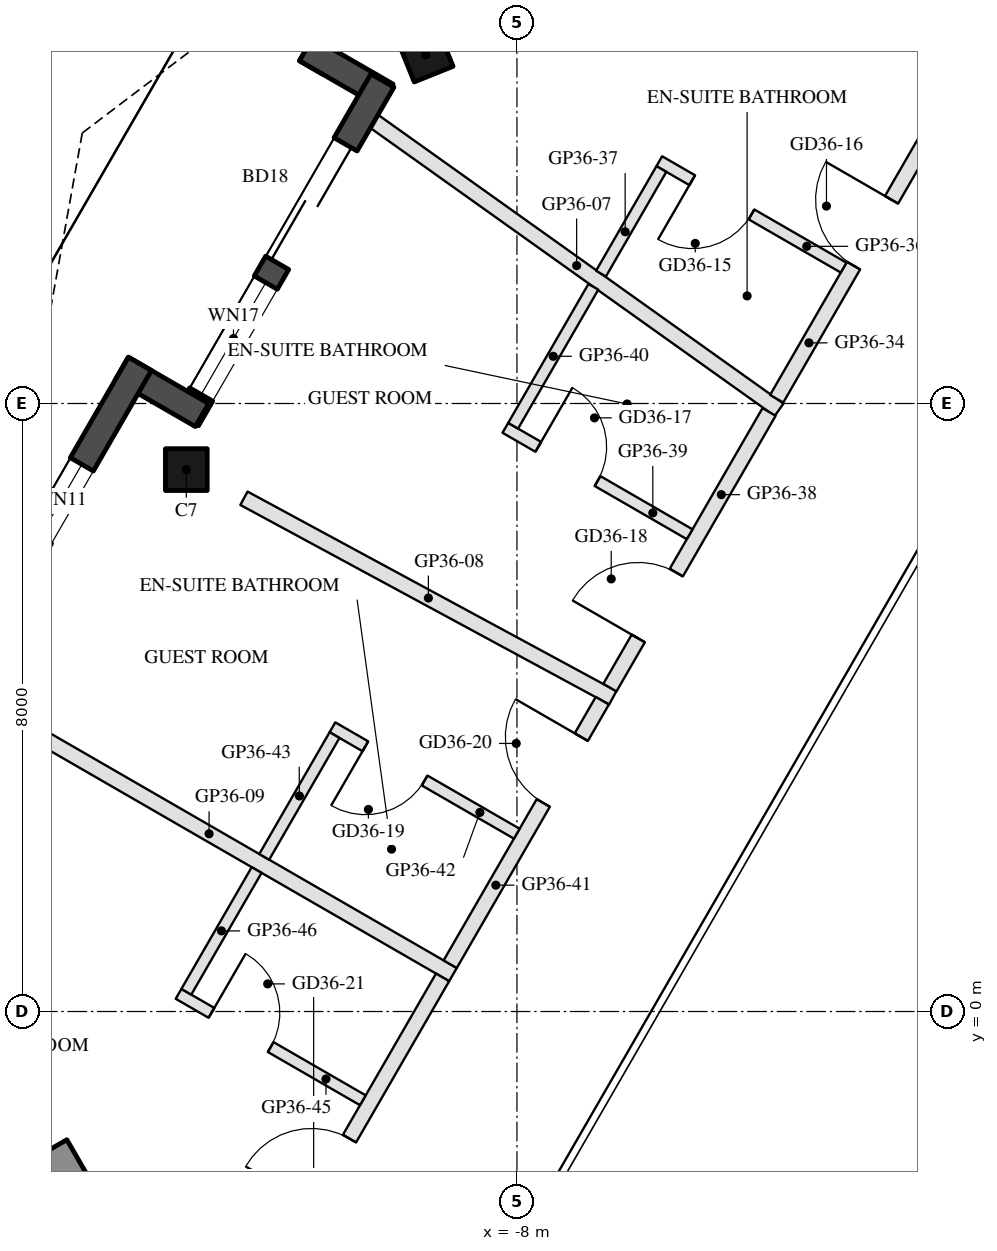
"""IFC4 building model, lengths in metres.
Left out: names, types, materials, properties, quantities, classifications, styles, units other than length and angle.
Written with IfcOpenShell. Run it as: python <this file> out.ifc"""

import sys

from ifc_helpers import new_model, si_unit, direction, frame, frame_2d, origin, origin_2d, place, context, subcontext, project, spatial, rectangle, hollow_rectangle, extrude, boolean, halfspace, element, fill, save


model = new_model("IFC4")
c1 = context("Model", 3, precision=1e-05, world=origin(), true_north=direction((0.0, 1.0)))
c2 = subcontext(c1, "Body", "Model", "MODEL_VIEW")
j1 = project(units=[si_unit("LENGTHUNIT", "METRE"), si_unit("PLANEANGLEUNIT", "RADIAN")], contexts=[c1])
p1 = place(None, origin())
s1 = spatial("IfcSite", under=j1, at=p1, CompositionType="ELEMENT")
p2 = place(p1, origin())
s2 = spatial("IfcBuilding", under=s1, at=p2, CompositionType="ELEMENT")
p3 = place(p2, frame((0.0, 0.0, 328.1)))
s3 = spatial("IfcBuildingStorey", under=s2, at=p3, CompositionType="ELEMENT", Elevation=328.1)
p4 = place(p3, frame((-9.198, 12.588, 0.0), z_axis=(0.100518021011, -0.128316722417, 0.98662604172), x_axis=(0.503129383785, 0.862065632243, 0.060857775822)))
e1 = element("IfcColumn", 1, at=p4, inside=s3, PredefinedType="COLUMN", context=c2, shape_type="SweptSolid", body=[
    boolean("DIFFERENCE", boolean("DIFFERENCE", extrude(hollow_rectangle(XDim=0.55, YDim=0.55, WallThickness=0.025, at=origin_2d()), origin(), (0.0, 0.0, 1.0), 3.75), halfspace(frame((0.0, 0.0, 0.034), z_axis=(0.0, 0.0, 1.0), x_axis=(1.0, 0.0, 0.0)), True)), halfspace(frame((0.0, 0.0, 3.735), z_axis=(0.0, 0.0, 1.0), x_axis=(1.0, 0.0, 0.0)), False)),
])
p5 = place(p3, frame((-12.35, 7.13, 0.0), z_axis=(0.131228839908, -0.075723997581, 0.988455799602), x_axis=(0.499707328911, 0.866194311446, 1.5866039e-05)))
e2 = element("IfcColumn", 2, at=p5, inside=s3, PredefinedType="COLUMN", context=c2, shape_type="SweptSolid", body=[
    boolean("DIFFERENCE", boolean("DIFFERENCE", extrude(hollow_rectangle(XDim=0.55, YDim=0.55, WallThickness=0.025, at=origin_2d()), origin(), (0.0, 0.0, 1.0), 3.743), halfspace(frame((0.0, 0.0, 0.031), z_axis=(0.0, 0.0, 1.0), x_axis=(1.0, 0.0, 0.0)), True)), halfspace(frame((0.0, 0.0, 3.729), z_axis=(0.0, 0.0, 1.0), x_axis=(1.0, 0.0, 0.0)), False)),
])
p6 = place(p3, frame((-5.905, 20.742, 0.0), z_axis=(0.0, 0.0, 1.0), x_axis=(-0.500003254449, -0.866023524819, 0.0)))
e3 = element("IfcWall", 3, at=p6, inside=s3, PredefinedType="SOLIDWALL", context=c2, shape_type="SweptSolid", body=[
    extrude(rectangle(XDim=9.608, YDim=0.35, at=frame_2d((4.804, 0.0))), origin(), (0.0, 0.0, 1.0), 3.45),
])
p7 = place(p6, frame((0.45, 0.0, 0.3)))
e4 = element("IfcOpeningElement", 4, at=p7, cuts=e3, PredefinedType="OPENING", context=c2, shape_type="SweptSolid", body=[
    extrude(rectangle(XDim=1.4, YDim=2.65, at=frame_2d((0.7, 1.325))), frame((0.0, 0.185, 0.0), z_axis=(0.0, -1.0, 0.0), x_axis=(1.0, 0.0, 0.0)), (0.0, 0.0, 1.0), 0.37),
])
p8 = place(p6, frame((5.68, 0.0, 0.0)))
e5 = element("IfcOpeningElement", 5, at=p8, cuts=e3, PredefinedType="OPENING", context=c2, shape_type="SweptSolid", body=[
    extrude(rectangle(XDim=2.4, YDim=2.4, at=frame_2d((1.2, 1.2))), frame((0.0, 0.185, 0.0), z_axis=(0.0, -1.0, 0.0), x_axis=(1.0, 0.0, 0.0)), (0.0, 0.0, 1.0), 0.37),
])
p9 = place(p6, frame((3.492, 0.0, 0.3)))
e6 = element("IfcOpeningElement", 6, at=p9, cuts=e3, PredefinedType="OPENING", context=c2, shape_type="SweptSolid", body=[
    extrude(rectangle(XDim=1.8, YDim=2.65, at=frame_2d((0.9, 1.325))), frame((0.0, 0.185, 0.0), z_axis=(0.0, -1.0, 0.0), x_axis=(1.0, 0.0, 0.0)), (0.0, 0.0, 1.0), 0.37),
])
p10 = place(p3, frame((-10.774, 12.66, 0.0), z_axis=(0.0, 0.0, 1.0), x_axis=(0.866142280446, -0.499797509021, 0.0)))
e7 = element("IfcWall", 7, at=p10, inside=s3, PredefinedType="SOLIDWALL", context=c2, shape_type="SweptSolid", body=[
    extrude(rectangle(XDim=1.22, YDim=0.35, at=frame_2d((0.61, 0.0))), origin(), (0.0, 0.0, 1.0), 3.45),
])
p11 = place(p3, frame((-9.77, 12.249, 0.0), z_axis=(0.0, 0.0, 1.0), x_axis=(-0.499999159329, -0.866025889145, 0.0)))
e8 = element("IfcWall", 8, at=p11, inside=s3, PredefinedType="SOLIDWALL", context=c2, shape_type="SweptSolid", body=[
    extrude(rectangle(XDim=5.143, YDim=0.35, at=frame_2d((2.571, 0.0))), origin(), (0.0, 0.0, 1.0), 3.45),
])
p12 = place(p11, frame((0.969, 0.0, 0.0)))
e9 = element("IfcOpeningElement", 9, at=p12, cuts=e8, PredefinedType="OPENING", context=c2, shape_type="SweptSolid", body=[
    extrude(rectangle(XDim=1.8, YDim=2.4, at=frame_2d((0.9, 1.2))), frame((0.0, 0.185, 0.0), z_axis=(0.0, -1.0, 0.0), x_axis=(1.0, 0.0, 0.0)), (0.0, 0.0, 1.0), 0.37),
])
p13 = place(p11, frame((3.069, 0.0, 0.3)))
e10 = element("IfcOpeningElement", 10, at=p13, cuts=e8, PredefinedType="OPENING", context=c2, shape_type="SweptSolid", body=[
    extrude(rectangle(XDim=1.7, YDim=2.65, at=frame_2d((0.85, 1.325))), frame((0.0, 0.185, 0.0), z_axis=(0.0, -1.0, 0.0), x_axis=(1.0, 0.0, 0.0)), (0.0, 0.0, 1.0), 0.37),
])
p14 = place(p3, frame((-12.143, 7.848, 0.0), z_axis=(0.0, 0.0, 1.0), x_axis=(-0.865955602162, 0.500120880472, 0.0)))
e11 = element("IfcWall", 11, at=p14, inside=s3, PredefinedType="SOLIDWALL", context=c2, shape_type="SweptSolid", body=[
    extrude(rectangle(XDim=1.22, YDim=0.35, at=frame_2d((0.61, 0.0))), origin(), (0.0, 0.0, 1.0), 3.45),
])
p15 = place(p3, frame((-12.961, 8.522, 0.0), z_axis=(0.0, 0.0, 1.0), x_axis=(-0.499995447853, -0.866028031952, 0.0)))
e12 = element("IfcWall", 12, at=p15, inside=s3, PredefinedType="SOLIDWALL", context=c2, shape_type="SweptSolid", body=[
    extrude(rectangle(XDim=8.103, YDim=0.35, at=frame_2d((4.051, 0.0))), origin(), (0.0, 0.0, 1.0), 3.45),
])
p16 = place(p15, frame((2.95, 0.0, 0.0)))
e13 = element("IfcOpeningElement", 13, at=p16, cuts=e12, PredefinedType="OPENING", context=c2, shape_type="SweptSolid", body=[
    extrude(rectangle(XDim=1.5, YDim=2.4, at=frame_2d((0.75, 1.2))), frame((0.0, 0.185, 0.0), z_axis=(0.0, -1.0, 0.0), x_axis=(1.0, 0.0, 0.0)), (0.0, 0.0, 1.0), 0.37),
])
p17 = place(p15, frame((1.528, 0.0, 0.3)))
e14 = element("IfcOpeningElement", 14, at=p17, cuts=e12, PredefinedType="OPENING", context=c2, shape_type="SweptSolid", body=[
    extrude(rectangle(XDim=1.1, YDim=2.65, at=frame_2d((0.55, 1.325))), frame((0.0, 0.185, 0.0), z_axis=(0.0, -1.0, 0.0), x_axis=(1.0, 0.0, 0.0)), (0.0, 0.0, 1.0), 0.37),
])
p18 = place(p15, frame((5.35, 0.0, 0.3)))
e15 = element("IfcOpeningElement", 15, at=p18, cuts=e12, PredefinedType="OPENING", context=c2, shape_type="SweptSolid", body=[
    extrude(rectangle(XDim=0.9, YDim=2.65, at=frame_2d((0.45, 1.325))), frame((0.0, 0.185, 0.0), z_axis=(0.0, -1.0, 0.0), x_axis=(1.0, 0.0, 0.0)), (0.0, 0.0, 1.0), 0.37),
])
p19 = place(p3, frame((-13.797, -1.903, 0.0), z_axis=(0.0, 0.0, 1.0), x_axis=(-0.866020367552, -0.500008722908, 0.0)))
e16 = element("IfcWall", 16, at=p19, inside=s3, PredefinedType="SHEAR", context=c2, shape_type="SweptSolid", body=[
    extrude(rectangle(XDim=4.085, YDim=0.5, at=frame_2d((2.042, 0.0))), origin(), (0.0, 0.0, 1.0), 3.45),
])
p20 = place(p3, frame((-9.878, 11.712, 0.0), z_axis=(0.0, 0.0, 1.0), x_axis=(0.814431562196, -0.580259623357, 0.0)))
e17 = element("IfcWall", 17, at=p20, inside=s3, PredefinedType="PARTITIONING", context=c2, shape_type="SweptSolid", body=[
    extrude(rectangle(XDim=6.54, YDim=0.2, at=frame_2d((3.27, 0.0))), origin(), (0.0, 0.0, 1.0), 3.05),
])
p21 = place(p3, frame((-11.592, 6.753, 0.0), z_axis=(0.0, 0.0, 1.0), x_axis=(0.879564392882, -0.475779863776, 0.0)))
e18 = element("IfcWall", 18, at=p21, inside=s3, PredefinedType="PARTITIONING", context=c2, shape_type="SweptSolid", body=[
    extrude(rectangle(XDim=5.517, YDim=0.2, at=frame_2d((2.759, 0.0))), origin(), (0.0, 0.0, 1.0), 3.05),
])
p22 = place(p3, frame((-15.259, 4.191, 0.0), z_axis=(0.0, 0.0, 1.0), x_axis=(0.866022643759, -0.500004780474, 0.0)))
e19 = element("IfcWall", 19, at=p22, inside=s3, PredefinedType="PARTITIONING", context=c2, shape_type="SweptSolid", body=[
    extrude(rectangle(XDim=7.411, YDim=0.2, at=frame_2d((3.705, 0.0))), origin(), (0.0, 0.0, 1.0), 3.05),
])
p23 = place(p3, frame((-4.583, 8.062, 0.0), z_axis=(0.0, 0.0, 1.0), x_axis=(0.50000452617, 0.866022790583, 0.0)))
e20 = element("IfcWall", 20, at=p23, inside=s3, PredefinedType="PARTITIONING", context=c2, shape_type="SweptSolid", body=[
    extrude(rectangle(XDim=4.246, YDim=0.2, at=frame_2d((2.123, 0.0))), origin(), (0.0, 0.0, 1.0), 3.05),
])
p24 = place(p23, frame((2.023, 0.0, 0.0)))
e21 = element("IfcOpeningElement", 21, at=p24, cuts=e20, PredefinedType="OPENING", context=c2, shape_type="SweptSolid", body=[
    extrude(rectangle(XDim=1.0, YDim=2.1, at=frame_2d((0.5, 1.05))), frame((0.0, 0.11, 0.0), z_axis=(0.0, -1.0, 0.0), x_axis=(1.0, 0.0, 0.0)), (0.0, 0.0, 1.0), 0.22),
])
p25 = place(p3, frame((-3.702, 9.788, 0.0), z_axis=(0.0, 0.0, 1.0), x_axis=(-0.866034573852, 0.49998411664, 0.0)))
e22 = element("IfcWall", 22, at=p25, inside=s3, PredefinedType="PARTITIONING", context=c2, shape_type="SweptSolid", body=[
    extrude(rectangle(XDim=2.8, YDim=0.15, at=frame_2d((1.4, 0.0))), origin(), (0.0, 0.0, 1.0), 3.45),
])
p26 = place(p25, frame((1.4, 0.0, 0.0)))
e23 = element("IfcOpeningElement", 23, at=p26, cuts=e22, PredefinedType="OPENING", context=c2, shape_type="SweptSolid", body=[
    extrude(rectangle(XDim=0.9, YDim=2.1, at=frame_2d((0.45, 1.05))), frame((0.0, 0.085, 0.0), z_axis=(0.0, -1.0, 0.0), x_axis=(1.0, 0.0, 0.0)), (0.0, 0.0, 1.0), 0.17),
])
p27 = place(p3, frame((-6.1, 11.085, 0.0), z_axis=(0.0, 0.0, 1.0), x_axis=(-0.49987316553, -0.866098619317, 0.0)))
e24 = element("IfcWall", 24, at=p27, inside=s3, PredefinedType="PARTITIONING", context=c2, shape_type="SweptSolid", body=[
    extrude(rectangle(XDim=1.589, YDim=0.15, at=frame_2d((0.795, 0.0))), origin(), (0.0, 0.0, 1.0), 3.05),
])
p28 = place(p3, frame((-6.777, 4.262, 0.0), z_axis=(0.0, 0.0, 1.0), x_axis=(0.500026956598, 0.866009839826, 0.0)))
e25 = element("IfcWall", 25, at=p28, inside=s3, PredefinedType="PARTITIONING", context=c2, shape_type="SweptSolid", body=[
    extrude(rectangle(XDim=4.187, YDim=0.2, at=frame_2d((2.094, 0.0))), origin(), (0.0, 0.0, 1.0), 3.05),
])
p29 = place(p28, frame((0.747, 0.0, 0.0)))
e26 = element("IfcOpeningElement", 26, at=p29, cuts=e25, PredefinedType="OPENING", context=c2, shape_type="SweptSolid", body=[
    extrude(rectangle(XDim=1.0, YDim=2.1, at=frame_2d((0.5, 1.05))), frame((0.0, 0.11, 0.0), z_axis=(0.0, -1.0, 0.0), x_axis=(1.0, 0.0, 0.0)), (0.0, 0.0, 1.0), 0.22),
])
p30 = place(p3, frame((-8.152, 7.68, 0.0), z_axis=(0.0, 0.0, 1.0), x_axis=(0.865996816683, -0.500049511043, 0.0)))
e27 = element("IfcWall", 27, at=p30, inside=s3, PredefinedType="PARTITIONING", context=c2, shape_type="SweptSolid", body=[
    extrude(rectangle(XDim=2.8, YDim=0.15, at=frame_2d((1.4, 0.0))), origin(), (0.0, 0.0, 1.0), 3.45),
])
p31 = place(p30, frame((0.5, 0.0, 0.0)))
e28 = element("IfcOpeningElement", 28, at=p31, cuts=e27, PredefinedType="OPENING", context=c2, shape_type="SweptSolid", body=[
    extrude(rectangle(XDim=0.9, YDim=2.1, at=frame_2d((0.45, 1.05))), frame((0.0, 0.085, 0.0), z_axis=(0.0, -1.0, 0.0), x_axis=(1.0, 0.0, 0.0)), (0.0, 0.0, 1.0), 0.17),
])
p32 = place(p3, frame((-6.995, 9.535, 0.0), z_axis=(0.0, 0.0, 1.0), x_axis=(-0.499982754166, -0.866035360443, 0.0)))
e29 = element("IfcWall", 29, at=p32, inside=s3, PredefinedType="PARTITIONING", context=c2, shape_type="SweptSolid", body=[
    extrude(rectangle(XDim=2.111, YDim=0.15, at=frame_2d((1.055, 0.0))), origin(), (0.0, 0.0, 1.0), 3.05),
])
p33 = place(p3, frame((-8.878, 0.623, 0.0), z_axis=(0.0, 0.0, 1.0), x_axis=(0.500009310088, 0.866020028536, 0.0)))
e30 = element("IfcWall", 30, at=p33, inside=s3, PredefinedType="PARTITIONING", context=c2, shape_type="SweptSolid", body=[
    extrude(rectangle(XDim=4.003, YDim=0.2, at=frame_2d((2.001, 0.0))), origin(), (0.0, 0.0, 1.0), 3.05),
])
p34 = place(p33, frame((2.45, 0.0, 0.0)))
e31 = element("IfcOpeningElement", 31, at=p34, cuts=e30, PredefinedType="OPENING", context=c2, shape_type="SweptSolid", body=[
    extrude(rectangle(XDim=1.0, YDim=2.1, at=frame_2d((0.5, 1.05))), frame((0.0, 0.11, 0.0), z_axis=(0.0, -1.0, 0.0), x_axis=(1.0, 0.0, 0.0)), (0.0, 0.0, 1.0), 0.22),
])
p35 = place(p3, frame((-8.002, 2.34, 0.0), z_axis=(0.0, 0.0, 1.0), x_axis=(-0.866056369097, 0.49994636267, 0.0)))
e32 = element("IfcWall", 32, at=p35, inside=s3, PredefinedType="PARTITIONING", context=c2, shape_type="SweptSolid", body=[
    extrude(rectangle(XDim=2.8, YDim=0.15, at=frame_2d((1.4, 0.0))), origin(), (0.0, 0.0, 1.0), 3.45),
])
p36 = place(p35, frame((1.4, 0.0, 0.0)))
e33 = element("IfcOpeningElement", 33, at=p36, cuts=e32, PredefinedType="OPENING", context=c2, shape_type="SweptSolid", body=[
    extrude(rectangle(XDim=0.9, YDim=2.1, at=frame_2d((0.45, 1.05))), frame((0.0, 0.085, 0.0), z_axis=(0.0, -1.0, 0.0), x_axis=(1.0, 0.0, 0.0)), (0.0, 0.0, 1.0), 0.17),
])
p37 = place(p3, frame((-10.4, 3.637, 0.0), z_axis=(0.0, 0.0, 1.0), x_axis=(-0.499985172903, -0.866033964044, 0.0)))
e34 = element("IfcWall", 34, at=p37, inside=s3, PredefinedType="PARTITIONING", context=c2, shape_type="SweptSolid", body=[
    extrude(rectangle(XDim=1.85, YDim=0.15, at=frame_2d((0.925, 0.0))), origin(), (0.0, 0.0, 1.0), 3.05),
])
p38 = place(p3, frame((-12.038, -4.85, 0.0), z_axis=(0.0, 0.0, 1.0), x_axis=(0.500001049025, 0.866024798128, 0.0)))
e35 = element("IfcWall", 35, at=p38, inside=s3, PredefinedType="PARTITIONING", context=c2, shape_type="SweptSolid", body=[
    extrude(rectangle(XDim=6.119, YDim=0.2, at=frame_2d((3.06, 0.0))), origin(), (0.0, 0.0, 1.0), 3.05),
])
p39 = place(p38, frame((2.669, 0.0, 0.0)))
e36 = element("IfcOpeningElement", 36, at=p39, cuts=e35, PredefinedType="OPENING", context=c2, shape_type="SweptSolid", body=[
    extrude(rectangle(XDim=1.0, YDim=2.1, at=frame_2d((0.5, 1.05))), frame((0.0, 0.11, 0.0), z_axis=(0.0, -1.0, 0.0), x_axis=(1.0, 0.0, 0.0)), (0.0, 0.0, 1.0), 0.22),
])
p40 = place(p3, frame((-12.452, 0.232, 0.0), z_axis=(0.0, 0.0, 1.0), x_axis=(0.866034573852, -0.49998411664, 0.0)))
e37 = element("IfcWall", 37, at=p40, inside=s3, PredefinedType="PARTITIONING", context=c2, shape_type="SweptSolid", body=[
    extrude(rectangle(XDim=2.8, YDim=0.15, at=frame_2d((1.4, 0.0))), origin(), (0.0, 0.0, 1.0), 3.05),
])
p41 = place(p40, frame((0.5, 0.0, 0.0)))
e38 = element("IfcOpeningElement", 38, at=p41, cuts=e37, PredefinedType="OPENING", context=c2, shape_type="SweptSolid", body=[
    extrude(rectangle(XDim=0.9, YDim=2.1, at=frame_2d((0.45, 1.05))), frame((0.0, 0.085, 0.0), z_axis=(0.0, -1.0, 0.0), x_axis=(1.0, 0.0, 0.0)), (0.0, 0.0, 1.0), 0.17),
])
p42 = place(p3, frame((-11.425, 1.862, 0.0), z_axis=(0.0, 0.0, 1.0), x_axis=(-0.499886193382, -0.866091100096, 0.0)))
e39 = element("IfcWall", 39, at=p42, inside=s3, PredefinedType="PARTITIONING", context=c2, shape_type="SweptSolid", body=[
    extrude(rectangle(XDim=1.85, YDim=0.15, at=frame_2d((0.925, 0.0))), origin(), (0.0, 0.0, 1.0), 3.45),
])
p43 = place(p12, frame((1.8, 0.0, 0.0), z_axis=(0.0, 0.0, 1.0), x_axis=(-1.0, 0.0, 0.0)))
e40 = element("IfcDoor", 40, at=p43, inside=s3, OperationType="SLIDING_TO_LEFT", PredefinedType="DOOR", context=c2, shape_type="SweptSolid", body=[
    extrude(rectangle(XDim=1.8, YDim=2.4, at=frame_2d((0.9, 1.2))), frame((0.0, 0.025, 0.0), z_axis=(0.0, -1.0, 0.0), x_axis=(1.0, 0.0, 0.0)), (0.0, 0.0, 1.0), 0.05),
])
fill(e9, e40)
p44 = place(p13, origin())
e41 = element("IfcWindow", 41, at=p44, inside=s3, PartitioningType="SINGLE_PANEL", PredefinedType="WINDOW", context=c2, shape_type="SweptSolid", body=[
    extrude(rectangle(XDim=1.7, YDim=2.65, at=frame_2d((0.85, 1.325))), frame((0.0, 0.03, 0.0), z_axis=(0.0, -1.0, 0.0), x_axis=(1.0, 0.0, 0.0)), (0.0, 0.0, 1.0), 0.06),
])
fill(e10, e41)
p45 = place(p17, origin())
e42 = element("IfcWindow", 42, at=p45, inside=s3, PartitioningType="SINGLE_PANEL", PredefinedType="WINDOW", context=c2, shape_type="SweptSolid", body=[
    extrude(rectangle(XDim=1.1, YDim=2.65, at=frame_2d((0.55, 1.325))), frame((0.0, 0.03, 0.0), z_axis=(0.0, -1.0, 0.0), x_axis=(1.0, 0.0, 0.0)), (0.0, 0.0, 1.0), 0.06),
])
fill(e14, e42)
p46 = place(p26, origin())
e43 = element("IfcDoor", 43, at=p46, inside=s3, OperationType="SINGLE_SWING_RIGHT", PredefinedType="DOOR", context=c2, shape_type="SweptSolid", body=[
    extrude(rectangle(XDim=0.9, YDim=2.1, at=frame_2d((0.45, 1.05))), frame((0.0, 0.025, 0.0), z_axis=(0.0, -1.0, 0.0), x_axis=(1.0, 0.0, 0.0)), (0.0, 0.0, 1.0), 0.05),
])
fill(e23, e43)
p47 = place(p24, origin())
e44 = element("IfcDoor", 44, at=p47, inside=s3, OperationType="SINGLE_SWING_RIGHT", PredefinedType="DOOR", context=c2, shape_type="SweptSolid", body=[
    extrude(rectangle(XDim=1.0, YDim=2.1, at=frame_2d((0.5, 1.05))), frame((0.0, 0.025, 0.0), z_axis=(0.0, -1.0, 0.0), x_axis=(1.0, 0.0, 0.0)), (0.0, 0.0, 1.0), 0.05),
])
fill(e21, e44)
p48 = place(p31, origin())
e45 = element("IfcDoor", 45, at=p48, inside=s3, OperationType="SINGLE_SWING_LEFT", PredefinedType="DOOR", context=c2, shape_type="SweptSolid", body=[
    extrude(rectangle(XDim=0.9, YDim=2.1, at=frame_2d((0.45, 1.05))), frame((0.0, 0.025, 0.0), z_axis=(0.0, -1.0, 0.0), x_axis=(1.0, 0.0, 0.0)), (0.0, 0.0, 1.0), 0.05),
])
fill(e28, e45)
p49 = place(p29, origin())
e46 = element("IfcDoor", 46, at=p49, inside=s3, OperationType="SINGLE_SWING_LEFT", PredefinedType="DOOR", context=c2, shape_type="SweptSolid", body=[
    extrude(rectangle(XDim=1.0, YDim=2.1, at=frame_2d((0.5, 1.05))), frame((0.0, 0.025, 0.0), z_axis=(0.0, -1.0, 0.0), x_axis=(1.0, 0.0, 0.0)), (0.0, 0.0, 1.0), 0.05),
])
fill(e26, e46)
p50 = place(p36, origin())
e47 = element("IfcDoor", 47, at=p50, inside=s3, OperationType="SINGLE_SWING_RIGHT", PredefinedType="DOOR", context=c2, shape_type="SweptSolid", body=[
    extrude(rectangle(XDim=0.9, YDim=2.1, at=frame_2d((0.45, 1.05))), frame((0.0, 0.025, 0.0), z_axis=(0.0, -1.0, 0.0), x_axis=(1.0, 0.0, 0.0)), (0.0, 0.0, 1.0), 0.05),
])
fill(e33, e47)
p51 = place(p34, origin())
e48 = element("IfcDoor", 48, at=p51, inside=s3, OperationType="SINGLE_SWING_RIGHT", PredefinedType="DOOR", context=c2, shape_type="SweptSolid", body=[
    extrude(rectangle(XDim=1.0, YDim=2.1, at=frame_2d((0.5, 1.05))), frame((0.0, 0.025, 0.0), z_axis=(0.0, -1.0, 0.0), x_axis=(1.0, 0.0, 0.0)), (0.0, 0.0, 1.0), 0.05),
])
fill(e31, e48)
p52 = place(p41, origin())
e49 = element("IfcDoor", 49, at=p52, inside=s3, OperationType="SINGLE_SWING_LEFT", PredefinedType="DOOR", context=c2, shape_type="SweptSolid", body=[
    extrude(rectangle(XDim=0.9, YDim=2.1, at=frame_2d((0.45, 1.05))), frame((0.0, 0.025, 0.0), z_axis=(0.0, -1.0, 0.0), x_axis=(1.0, 0.0, 0.0)), (0.0, 0.0, 1.0), 0.05),
])
fill(e38, e49)
p53 = place(p39, origin())
e50 = element("IfcDoor", 50, at=p53, inside=s3, OperationType="SINGLE_SWING_LEFT", PredefinedType="DOOR", context=c2, shape_type="SweptSolid", body=[
    extrude(rectangle(XDim=1.0, YDim=2.1, at=frame_2d((0.5, 1.05))), frame((0.0, 0.025, 0.0), z_axis=(0.0, -1.0, 0.0), x_axis=(1.0, 0.0, 0.0)), (0.0, 0.0, 1.0), 0.05),
])
fill(e36, e50)
save(model, sys.argv[1])
